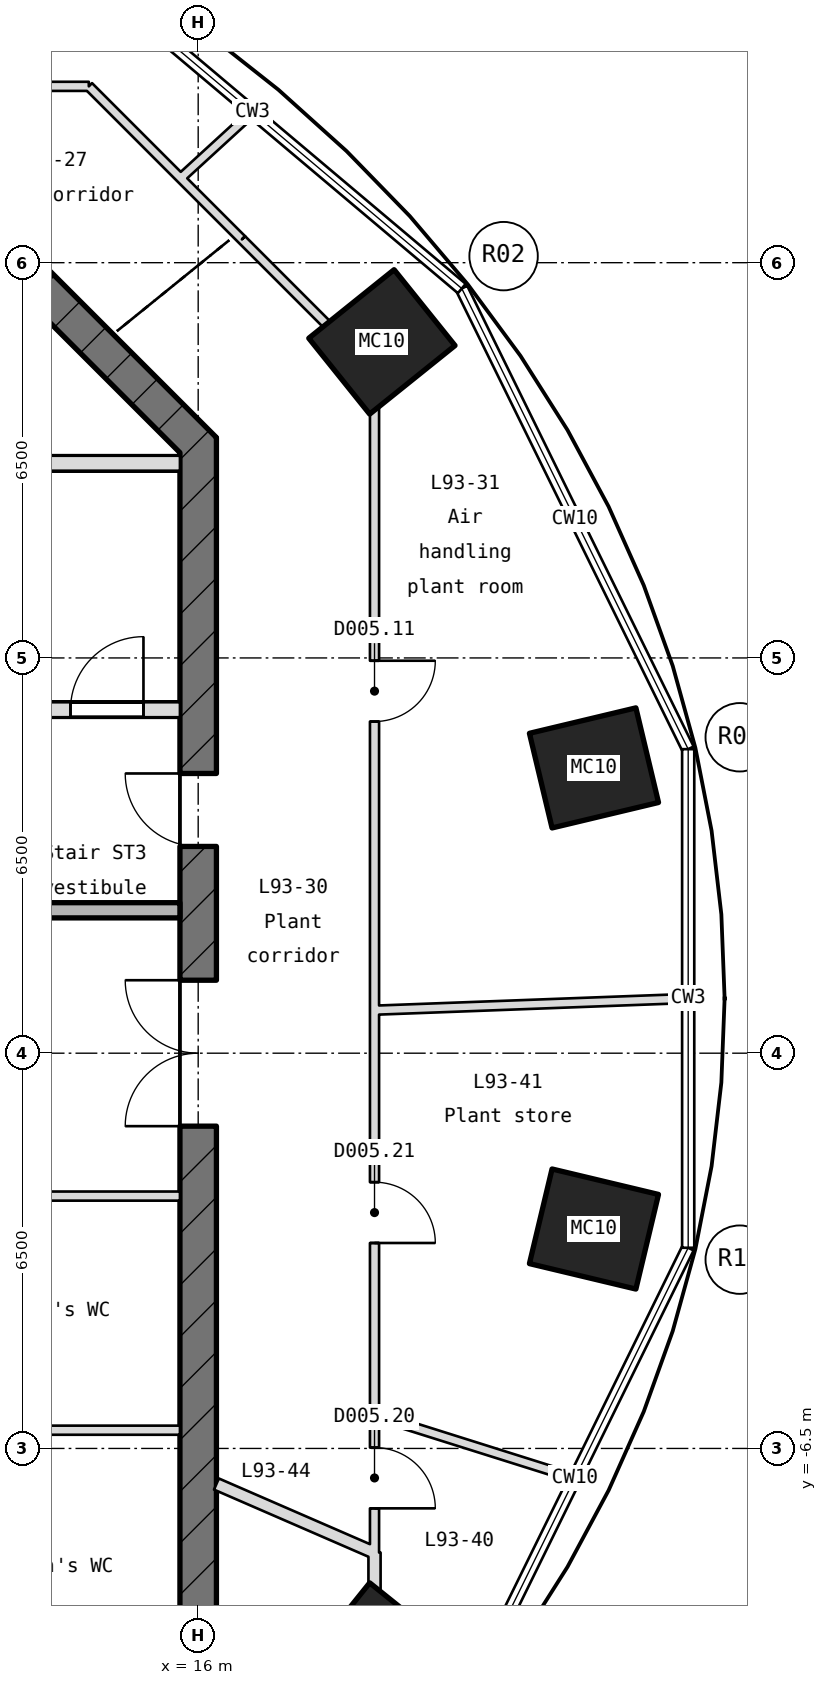
"""IFC4 building model, lengths in metres.
Left out: names, types, materials, properties, quantities, classifications, styles, units other than length and angle.
Written with IfcOpenShell. Run it as: python <this file> out.ifc"""

import sys

from ifc_helpers import new_model, si_unit, direction, frame, frame_2d, origin, origin_2d, place, context, subcontext, project, spatial, rectangle, hollow_rectangle, extrude, element, fill, save


model = new_model("IFC4")
c1 = context("Model", 3, precision=1e-05, world=origin(), true_north=direction((0.0, 1.0)))
c2 = subcontext(c1, "Body", "Model", "MODEL_VIEW")
j1 = project(units=[si_unit("LENGTHUNIT", "METRE"), si_unit("PLANEANGLEUNIT", "RADIAN")], contexts=[c1])
p1 = place(None, origin())
s1 = spatial("IfcSite", under=j1, at=p1, CompositionType="ELEMENT")
p2 = place(p1, origin())
s2 = spatial("IfcBuilding", under=s1, at=p2, CompositionType="ELEMENT")
p3 = place(p2, frame((0.0, 0.0, 413.55)))
s3 = spatial("IfcBuildingStorey", under=s2, at=p3, CompositionType="ELEMENT", Elevation=413.55)
for number, where, z_axis, x_axis in (
    (1, (22.509, 4.692, -0.2), (0.0, 0.0, 1.0), (0.233, -0.973, 0.0)),
    (2, (19.021, 11.698, -0.2), (0.0, 0.0, 1.0), (0.626, -0.78, 0.0)),
    (3, (12.577, 17.06, -0.2), (0.0, 0.0, 1.0), (0.874, -0.486, 0.0)),
    (4, (19.021, -9.897, -0.2), (0.0, 0.0, 1.0), (-0.626, -0.78, 0.0)),
    (5, (22.509, -2.892, -0.2), (0.0, 0.0, 1.0), (-0.233, -0.973, 0.0)),
):
    element("IfcColumn", number, at=place(p3, frame(where, z_axis=z_axis, x_axis=x_axis)), inside=s3, PredefinedType="COLUMN", context=c2, shape_type="SweptSolid", body=[
        extrude(hollow_rectangle(XDim=1.6, YDim=1.8, WallThickness=0.045, at=origin_2d()), origin(), (0.0, 0.0, 1.0), 5.0),
    ])
p4 = place(p3, frame((16.0, -10.124, -0.2), z_axis=(0.0, 0.0, 1.0), x_axis=(0.0, 1.0, 0.0)))
e6 = element("IfcWall", 6, at=p4, inside=s3, PredefinedType="SHEAR", context=c2, shape_type="SweptSolid", body=[
    extrude(rectangle(XDim=20.249, YDim=0.6, at=frame_2d((10.124, 0.0))), origin(), (0.0, 0.0, 1.0), 5.0),
])
p5 = place(p4, frame((8.924, 0.0, 0.2)))
e7 = element("IfcOpeningElement", 7, at=p5, cuts=e6, PredefinedType="OPENING", context=c2, shape_type="SweptSolid", body=[
    extrude(rectangle(XDim=2.4, YDim=2.1, at=frame_2d((1.2, 1.05))), frame((0.0, 0.31, 0.0), z_axis=(0.0, -1.0, 0.0), x_axis=(1.0, 0.0, 0.0)), (0.0, 0.0, 1.0), 0.62),
])
p6 = place(p4, frame((13.524, 0.0, 0.2)))
e8 = element("IfcOpeningElement", 8, at=p6, cuts=e6, PredefinedType="OPENING", context=c2, shape_type="SweptSolid", body=[
    extrude(rectangle(XDim=1.2, YDim=2.1, at=frame_2d((0.6, 1.05))), frame((0.0, 0.31, 0.0), z_axis=(0.0, -1.0, 0.0), x_axis=(1.0, 0.0, 0.0)), (0.0, 0.0, 1.0), 0.62),
])
p7 = place(p3, frame((16.088, 9.912, -0.2), z_axis=(0.0, 0.0, 1.0), x_axis=(-0.707106781187, 0.707106781187, 0.0)))
e9 = element("IfcWall", 9, at=p7, inside=s3, PredefinedType="SHEAR", context=c2, shape_type="SweptSolid", body=[
    extrude(rectangle(XDim=4.491, YDim=0.6, at=frame_2d((2.246, 0.0))), origin(), (0.0, 0.0, 1.0), 5.0),
])
p8 = place(p3, frame((10.975, -6.2, 0.0), z_axis=(0.0, 0.0, 1.0), x_axis=(1.0, 0.0, 0.0)))
e10 = element("IfcWall", 10, at=p8, inside=s3, PredefinedType="PARTITIONING", context=c2, shape_type="SweptSolid", body=[
    extrude(rectangle(XDim=4.725, YDim=0.15, at=frame_2d((2.362, 0.0))), origin(), (0.0, 0.0, 1.0), 4.8),
])
p9 = place(p3, frame((8.4, -2.35, 0.0), z_axis=(0.0, 0.0, 1.0), x_axis=(1.0, 0.0, 0.0)))
e11 = element("IfcWall", 11, at=p9, inside=s3, PredefinedType="PARTITIONING", context=c2, shape_type="SweptSolid", body=[
    extrude(rectangle(XDim=7.3, YDim=0.15, at=frame_2d((3.65, 0.0))), origin(), (0.0, 0.0, 1.0), 4.8),
])
p10 = place(p3, frame((8.4, 2.35, 0.0), z_axis=(0.0, 0.0, 1.0), x_axis=(1.0, 0.0, 0.0)))
e12 = element("IfcWall", 12, at=p10, inside=s3, PredefinedType="STANDARD", context=c2, shape_type="SweptSolid", body=[
    extrude(rectangle(XDim=7.3, YDim=0.25, at=frame_2d((3.65, 0.0))), origin(), (0.0, 0.0, 1.0), 4.8),
])
p11 = place(p3, frame((8.55, 5.65, -0.2), z_axis=(0.0, 0.0, 1.0), x_axis=(1.0, 0.0, 0.0)))
e13 = element("IfcWall", 13, at=p11, inside=s3, PredefinedType="SHEAR", context=c2, shape_type="SweptSolid", body=[
    extrude(rectangle(XDim=7.15, YDim=0.25, at=frame_2d((3.575, 0.0))), origin(), (0.0, 0.0, 1.0), 5.0),
])
p12 = place(p11, frame((5.35, 0.0, 0.2)))
e14 = element("IfcOpeningElement", 14, at=p12, cuts=e13, PredefinedType="OPENING", context=c2, shape_type="SweptSolid", body=[
    extrude(rectangle(XDim=1.2, YDim=2.1, at=frame_2d((0.6, 1.05))), frame((0.0, 0.135, 0.0), z_axis=(0.0, -1.0, 0.0), x_axis=(1.0, 0.0, 0.0)), (0.0, 0.0, 1.0), 0.27),
])
p13 = place(p3, frame((8.55, 9.7, -0.2), z_axis=(0.0, 0.0, 1.0), x_axis=(1.0, 0.0, 0.0)))
e15 = element("IfcWall", 15, at=p13, inside=s3, PredefinedType="SHEAR", context=c2, shape_type="SweptSolid", body=[
    extrude(rectangle(XDim=7.15, YDim=0.25, at=frame_2d((3.575, 0.0))), origin(), (0.0, 0.0, 1.0), 5.0),
])
p14 = place(p3, frame((-14.201, 15.9, 0.0), z_axis=(0.0, 0.0, 1.0), x_axis=(1.0, 0.0, 0.0)))
e16 = element("IfcWall", 16, at=p14, inside=s3, PredefinedType="PARTITIONING", context=c2, shape_type="SweptSolid", body=[
    extrude(rectangle(XDim=28.403, YDim=0.15, at=frame_2d((14.201, 0.0))), origin(), (0.0, 0.0, 1.0), 4.8),
])
p15 = place(p14, frame((22.463, 0.0, 0.0)))
e17 = element("IfcOpeningElement", 17, at=p15, cuts=e16, PredefinedType="OPENING", context=c2, shape_type="SweptSolid", body=[
    extrude(rectangle(XDim=1.0, YDim=2.1, at=frame_2d((0.5, 1.05))), frame((0.0, 0.085, 0.0), z_axis=(0.0, -1.0, 0.0), x_axis=(1.0, 0.0, 0.0)), (0.0, 0.0, 1.0), 0.17),
])
p16 = place(p14, frame((11.472, 0.0, 0.0)))
e18 = element("IfcOpeningElement", 18, at=p16, cuts=e16, PredefinedType="OPENING", context=c2, shape_type="SweptSolid", body=[
    extrude(rectangle(XDim=1.0, YDim=2.1, at=frame_2d((0.5, 1.05))), frame((0.0, 0.085, 0.0), z_axis=(0.0, -1.0, 0.0), x_axis=(1.0, 0.0, 0.0)), (0.0, 0.0, 1.0), 0.17),
])
p17 = place(p14, frame((2.71, 0.0, 0.0)))
e19 = element("IfcOpeningElement", 19, at=p17, cuts=e16, PredefinedType="OPENING", context=c2, shape_type="SweptSolid", body=[
    extrude(rectangle(XDim=1.0, YDim=2.1, at=frame_2d((0.5, 1.05))), frame((0.0, 0.085, 0.0), z_axis=(0.0, -1.0, 0.0), x_axis=(1.0, 0.0, 0.0)), (0.0, 0.0, 1.0), 0.17),
])
p18 = place(p3, frame((18.9, 0.707, 0.0), z_axis=(0.0, 0.0, 1.0), x_axis=(0.999299991519, 0.037410251951, 0.0)))
e20 = element("IfcWall", 20, at=p18, inside=s3, PredefinedType="PARTITIONING", context=c2, shape_type="SweptSolid", body=[
    extrude(rectangle(XDim=5.143, YDim=0.15, at=frame_2d((2.571, 0.0))), origin(), (0.0, 0.0, 1.0), 4.8),
])
p19 = place(p3, frame((15.711, 14.39, 0.0), z_axis=(0.0, 0.0, 1.0), x_axis=(0.737460947252, 0.675389777298, 0.0)))
e21 = element("IfcWall", 21, at=p19, inside=s3, PredefinedType="PARTITIONING", context=c2, shape_type="SweptSolid", body=[
    extrude(rectangle(XDim=1.585, YDim=0.15, at=frame_2d((0.792, 0.0))), origin(), (0.0, 0.0, 1.0), 4.8),
])
p20 = place(p3, frame((18.9, -8.216, 0.0), z_axis=(0.0, 0.0, 1.0), x_axis=(0.0, 1.0, 0.0)))
e22 = element("IfcWall", 22, at=p20, inside=s3, PredefinedType="PARTITIONING", context=c2, shape_type="SweptSolid", body=[
    extrude(rectangle(XDim=19.417, YDim=0.15, at=frame_2d((9.708, 0.0))), origin(), (0.0, 0.0, 1.0), 4.8),
])
p21 = place(p20, frame((13.67, 0.0, 0.0)))
e23 = element("IfcOpeningElement", 23, at=p21, cuts=e22, PredefinedType="OPENING", context=c2, shape_type="SweptSolid", body=[
    extrude(rectangle(XDim=1.0, YDim=2.1, at=frame_2d((0.5, 1.05))), frame((0.0, 0.085, 0.0), z_axis=(0.0, -1.0, 0.0), x_axis=(1.0, 0.0, 0.0)), (0.0, 0.0, 1.0), 0.17),
])
p22 = place(p20, frame((0.73, 0.0, 0.0)))
e24 = element("IfcOpeningElement", 24, at=p22, cuts=e22, PredefinedType="OPENING", context=c2, shape_type="SweptSolid", body=[
    extrude(rectangle(XDim=1.0, YDim=2.1, at=frame_2d((0.5, 1.05))), frame((0.0, 0.085, 0.0), z_axis=(0.0, -1.0, 0.0), x_axis=(1.0, 0.0, 0.0)), (0.0, 0.0, 1.0), 0.17),
])
p23 = place(p20, frame((5.094, 0.0, 0.0)))
e25 = element("IfcOpeningElement", 25, at=p23, cuts=e22, PredefinedType="OPENING", context=c2, shape_type="SweptSolid", body=[
    extrude(rectangle(XDim=1.0, YDim=2.1, at=frame_2d((0.5, 1.05))), frame((0.0, 0.085, 0.0), z_axis=(0.0, -1.0, 0.0), x_axis=(1.0, 0.0, 0.0)), (0.0, 0.0, 1.0), 0.17),
])
p24 = place(p3, frame((18.9, 11.201, 0.0), z_axis=(0.0, 0.0, 1.0), x_axis=(-0.707283756971, 0.706929761097, 0.0)))
e26 = element("IfcWall", 26, at=p24, inside=s3, PredefinedType="PARTITIONING", context=c2, shape_type="SweptSolid", body=[
    extrude(rectangle(XDim=0.69, YDim=0.15, at=frame_2d((0.345, 0.0))), origin(), (0.0, 0.0, 1.0), 4.8),
])
p25 = place(p3, frame((18.412, 11.689, 0.0), z_axis=(0.0, 0.0, 1.0), x_axis=(-0.707055831388, 0.707157727314, 0.0)))
e27 = element("IfcWall", 27, at=p25, inside=s3, PredefinedType="PARTITIONING", context=c2, shape_type="SweptSolid", body=[
    extrude(rectangle(XDim=2.396, YDim=0.15, at=frame_2d((1.198, 0.0))), origin(), (0.0, 0.0, 1.0), 4.338),
])
p26 = place(p3, frame((16.718, 13.383, 0.0), z_axis=(0.0, 0.0, 1.0), x_axis=(-0.70703818665, 0.707175369069, 0.0)))
e28 = element("IfcWall", 28, at=p26, inside=s3, PredefinedType="PARTITIONING", context=c2, shape_type="SweptSolid", body=[
    extrude(rectangle(XDim=3.559, YDim=0.15, at=frame_2d((1.78, 0.0))), origin(), (0.0, 0.0, 1.0), 4.8),
])
p27 = place(p3, frame((22.178, -6.981, 0.0), z_axis=(0.0, 0.0, 1.0), x_axis=(-0.95386356969, 0.300240387719, 0.0)))
e29 = element("IfcWall", 29, at=p27, inside=s3, PredefinedType="PARTITIONING", context=c2, shape_type="SweptSolid", body=[
    extrude(rectangle(XDim=3.436, YDim=0.15, at=frame_2d((1.718, 0.0))), origin(), (0.0, 0.0, 1.0), 4.8),
])
p28 = place(p3, frame((18.9, -11.958, 0.0), z_axis=(0.0, 0.0, 1.0), x_axis=(0.0, 1.0, 0.0)))
e30 = element("IfcWall", 30, at=p28, inside=s3, PredefinedType="PARTITIONING", context=c2, shape_type="SweptSolid", body=[
    extrude(rectangle(XDim=3.746, YDim=0.2, at=frame_2d((1.873, 0.0))), origin(), (0.0, 0.0, 1.0), 4.8),
])
p29 = place(p3, frame((18.9, -8.216, 0.0), z_axis=(0.0, 0.0, 1.0), x_axis=(-0.917070056253, 0.398726111414, 0.0)))
e31 = element("IfcWall", 31, at=p29, inside=s3, PredefinedType="PARTITIONING", context=c2, shape_type="SweptSolid", body=[
    extrude(rectangle(XDim=2.835, YDim=0.2, at=frame_2d((1.417, 0.0))), origin(), (0.0, 0.0, 1.0), 4.8),
])
p30 = place(p12, origin())
e32 = element("IfcDoor", 32, at=p30, inside=s3, OperationType="SINGLE_SWING_RIGHT", PredefinedType="DOOR", context=c2, shape_type="SweptSolid", body=[
    extrude(rectangle(XDim=1.2, YDim=2.1, at=frame_2d((0.6, 1.05))), frame((0.0, 0.025, 0.0), z_axis=(0.0, -1.0, 0.0), x_axis=(1.0, 0.0, 0.0)), (0.0, 0.0, 1.0), 0.05),
])
fill(e14, e32)
p31 = place(p5, origin())
e33 = element("IfcDoor", 33, at=p31, inside=s3, OperationType="DOUBLE_DOOR_SINGLE_SWING", PredefinedType="DOOR", context=c2, shape_type="SweptSolid", body=[
    extrude(rectangle(XDim=2.4, YDim=2.1, at=frame_2d((1.2, 1.05))), frame((0.0, 0.025, 0.0), z_axis=(0.0, -1.0, 0.0), x_axis=(1.0, 0.0, 0.0)), (0.0, 0.0, 1.0), 0.05),
])
fill(e7, e33)
p32 = place(p6, origin())
e34 = element("IfcDoor", 34, at=p32, inside=s3, OperationType="SINGLE_SWING_RIGHT", PredefinedType="DOOR", context=c2, shape_type="SweptSolid", body=[
    extrude(rectangle(XDim=1.2, YDim=2.1, at=frame_2d((0.6, 1.05))), frame((0.0, 0.025, 0.0), z_axis=(0.0, -1.0, 0.0), x_axis=(1.0, 0.0, 0.0)), (0.0, 0.0, 1.0), 0.05),
])
fill(e8, e34)
p33 = place(p21, frame((1.0, 0.0, 0.0), z_axis=(0.0, 0.0, 1.0), x_axis=(-1.0, 0.0, 0.0)))
e35 = element("IfcDoor", 35, at=p33, inside=s3, OperationType="SINGLE_SWING_LEFT", PredefinedType="DOOR", context=c2, shape_type="SweptSolid", body=[
    extrude(rectangle(XDim=1.0, YDim=2.1, at=frame_2d((0.5, 1.05))), frame((0.0, 0.025, 0.0), z_axis=(0.0, -1.0, 0.0), x_axis=(1.0, 0.0, 0.0)), (0.0, 0.0, 1.0), 0.05),
])
fill(e23, e35)
p34 = place(p22, frame((1.0, 0.0, 0.0), z_axis=(0.0, 0.0, 1.0), x_axis=(-1.0, 0.0, 0.0)))
e36 = element("IfcDoor", 36, at=p34, inside=s3, OperationType="SINGLE_SWING_LEFT", PredefinedType="DOOR", context=c2, shape_type="SweptSolid", body=[
    extrude(rectangle(XDim=1.0, YDim=2.1, at=frame_2d((0.5, 1.05))), frame((0.0, 0.025, 0.0), z_axis=(0.0, -1.0, 0.0), x_axis=(1.0, 0.0, 0.0)), (0.0, 0.0, 1.0), 0.05),
])
fill(e24, e36)
p35 = place(p23, frame((1.0, 0.0, 0.0), z_axis=(0.0, 0.0, 1.0), x_axis=(-1.0, 0.0, 0.0)))
e37 = element("IfcDoor", 37, at=p35, inside=s3, OperationType="SINGLE_SWING_LEFT", PredefinedType="DOOR", context=c2, shape_type="SweptSolid", body=[
    extrude(rectangle(XDim=1.0, YDim=2.1, at=frame_2d((0.5, 1.05))), frame((0.0, 0.025, 0.0), z_axis=(0.0, -1.0, 0.0), x_axis=(1.0, 0.0, 0.0)), (0.0, 0.0, 1.0), 0.05),
])
fill(e25, e37)
save(model, sys.argv[1])
